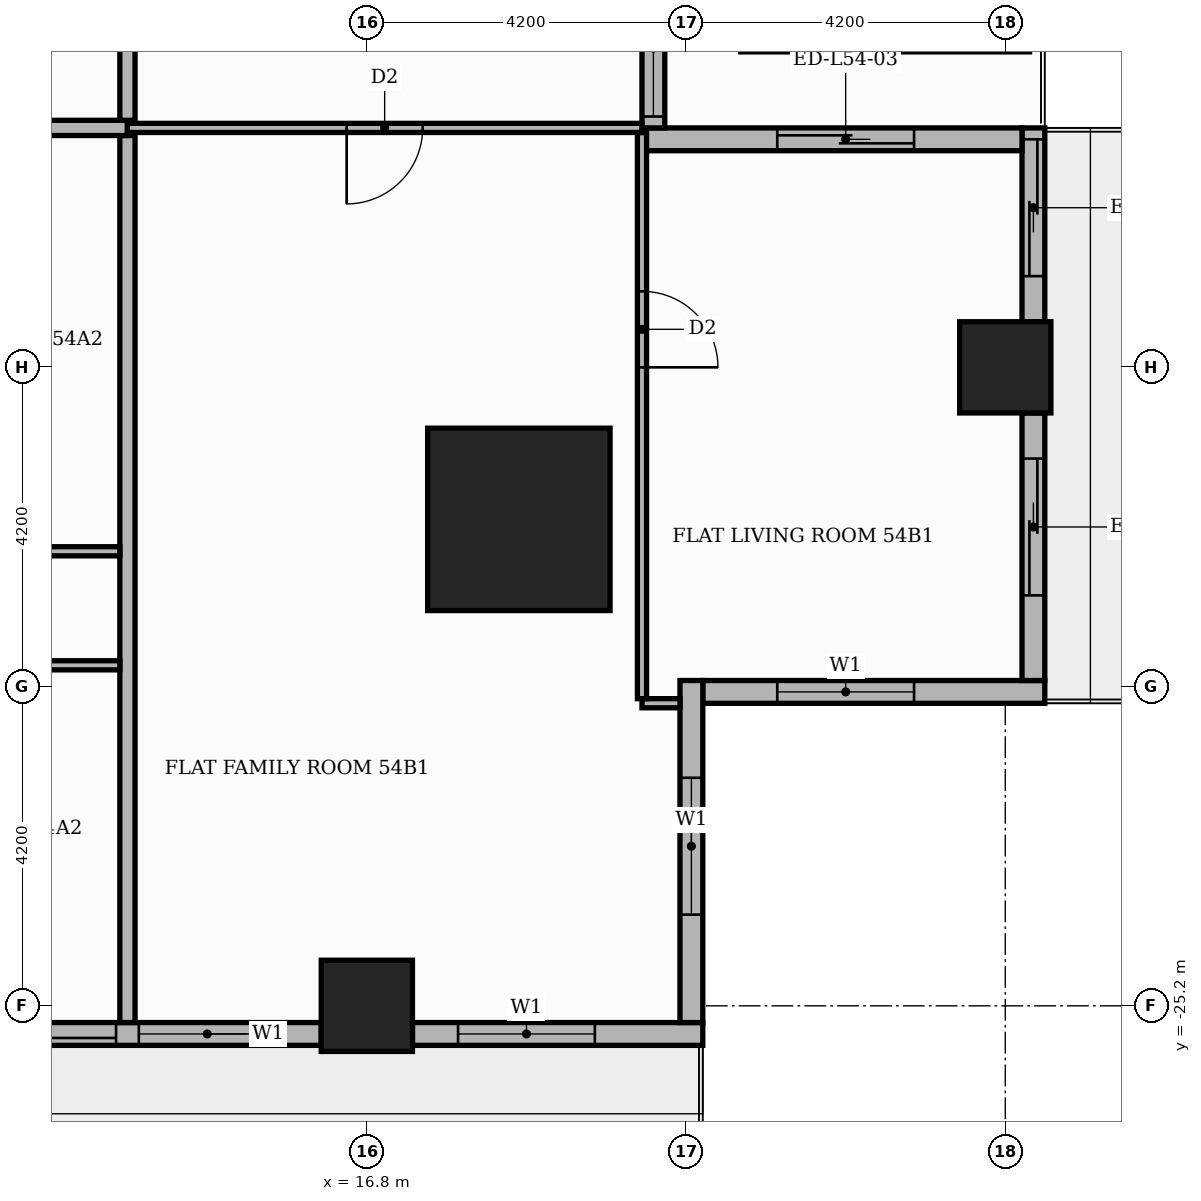
"""IFC4 building model, lengths in metres.
Left out: names, types, materials, properties, quantities, classifications, styles, units other than length and angle.
Written with IfcOpenShell. Run it as: python <this file> out.ifc"""

import sys

from ifc_helpers import new_model, si_unit, direction, frame, frame_2d, origin, origin_2d, place, context, subcontext, project, spatial, rectangle, extrude, element, fill, save


model = new_model("IFC4")
c1 = context("Model", 3, precision=1e-05, world=origin(), true_north=direction((0.0, 1.0)))
c2 = subcontext(c1, "Body", "Model", "MODEL_VIEW")
j1 = project(units=[si_unit("LENGTHUNIT", "METRE"), si_unit("PLANEANGLEUNIT", "RADIAN")], contexts=[c1])
p1 = place(None, origin())
s1 = spatial("IfcSite", under=j1, at=p1, CompositionType="ELEMENT")
p2 = place(p1, origin())
s2 = spatial("IfcBuilding", under=s1, at=p2, CompositionType="ELEMENT")
p3 = place(p2, frame((0.0, 0.0, 227.4)))
s3 = spatial("IfcBuildingStorey", under=s2, at=p3, CompositionType="ELEMENT", Elevation=227.4)
p4 = place(p3, frame((18.8, -18.8, 0.0), z_axis=(0.0, 0.0, 1.0), x_axis=(1.0, 0.0, 0.0)))
e1 = element("IfcColumn", 1, at=p4, inside=s3, PredefinedType="COLUMN", context=c2, shape_type="SweptSolid", body=[
    extrude(rectangle(XDim=2.4, YDim=2.4, at=origin_2d()), origin(), (0.0, 0.0, 1.0), 3.9),
])
for number, where, z_axis, x_axis in (
    (2, (25.2, -16.8, 0.0), (0.0, 0.0, 1.0), (1.0, 0.0, 0.0)),
    (3, (16.8, -25.2, 0.0), (0.0, 0.0, 1.0), (1.0, 0.0, 0.0)),
):
    element("IfcColumn", number, at=place(p3, frame(where, z_axis=z_axis, x_axis=x_axis)), inside=s3, PredefinedType="COLUMN", context=c2, shape_type="SweptSolid", body=[
        extrude(rectangle(XDim=1.2, YDim=1.2, at=origin_2d()), origin(), (0.0, 0.0, 1.0), 3.9),
    ])
p5 = place(p3, frame((21.22, -21.07, 0.0), z_axis=(0.0, 0.0, 1.0), x_axis=(1.0, 0.0, 0.0)))
e4 = element("IfcWall", 4, at=p5, inside=s3, PredefinedType="STANDARD", context=c2, shape_type="SweptSolid", body=[
    extrude(rectangle(XDim=4.5, YDim=0.3, at=frame_2d((2.25, 0.0))), origin(), (0.0, 0.0, 1.0), 3.48),
])
p6 = place(p5, frame((0.98, 0.0, 0.9)))
e5 = element("IfcOpeningElement", 5, at=p6, cuts=e4, PredefinedType="OPENING", context=c2, shape_type="SweptSolid", body=[
    extrude(rectangle(XDim=1.8, YDim=2.1, at=frame_2d((0.9, 1.05))), frame((0.0, 0.16, 0.0), z_axis=(0.0, -1.0, 0.0), x_axis=(1.0, 0.0, 0.0)), (0.0, 0.0, 1.0), 0.32),
])
p7 = place(p3, frame((25.57, -20.92, 0.0), z_axis=(0.0, 0.0, 1.0), x_axis=(0.0, 1.0, 0.0)))
e6 = element("IfcWall", 6, at=p7, inside=s3, PredefinedType="STANDARD", context=c2, shape_type="SweptSolid", body=[
    extrude(rectangle(XDim=3.52, YDim=0.3, at=frame_2d((1.76, 0.0))), origin(), (0.0, 0.0, 1.0), 3.48),
])
p8 = place(p7, frame((1.12, 0.0, 0.0)))
e7 = element("IfcOpeningElement", 7, at=p8, cuts=e6, PredefinedType="OPENING", context=c2, shape_type="SweptSolid", body=[
    extrude(rectangle(XDim=1.8, YDim=2.4, at=frame_2d((0.9, 1.2))), frame((0.0, 0.16, 0.0), z_axis=(0.0, -1.0, 0.0), x_axis=(1.0, 0.0, 0.0)), (0.0, 0.0, 1.0), 0.32),
])
p9 = place(p3, frame((25.57, -16.2, 0.0), z_axis=(0.0, 0.0, 1.0), x_axis=(0.0, 1.0, 0.0)))
e8 = element("IfcWall", 8, at=p9, inside=s3, PredefinedType="STANDARD", context=c2, shape_type="SweptSolid", body=[
    extrude(rectangle(XDim=2.55, YDim=0.3, at=frame_2d((1.275, 0.0))), origin(), (0.0, 0.0, 1.0), 3.48),
])
p10 = place(p9, frame((0.6, 0.0, 0.0)))
e9 = element("IfcOpeningElement", 9, at=p10, cuts=e8, PredefinedType="OPENING", context=c2, shape_type="SweptSolid", body=[
    extrude(rectangle(XDim=1.8, YDim=2.4, at=frame_2d((0.9, 1.2))), frame((0.0, 0.16, 0.0), z_axis=(0.0, -1.0, 0.0), x_axis=(1.0, 0.0, 0.0)), (0.0, 0.0, 1.0), 0.32),
])
p11 = place(p3, frame((25.42, -13.8, 0.0), z_axis=(0.0, 0.0, 1.0), x_axis=(-1.0, 0.0, 0.0)))
e10 = element("IfcWall", 10, at=p11, inside=s3, PredefinedType="STANDARD", context=c2, shape_type="SweptSolid", body=[
    extrude(rectangle(XDim=5.0, YDim=0.3, at=frame_2d((2.5, 0.0))), origin(), (0.0, 0.0, 1.0), 3.48),
])
p12 = place(p11, frame((1.42, 0.0, 0.0)))
e11 = element("IfcOpeningElement", 11, at=p12, cuts=e10, PredefinedType="OPENING", context=c2, shape_type="SweptSolid", body=[
    extrude(rectangle(XDim=1.8, YDim=2.4, at=frame_2d((0.9, 1.2))), frame((0.0, 0.16, 0.0), z_axis=(0.0, -1.0, 0.0), x_axis=(1.0, 0.0, 0.0)), (0.0, 0.0, 1.0), 0.32),
])
p13 = place(p3, frame((20.57, -13.65, 0.0), z_axis=(0.0, 0.0, 1.0), x_axis=(0.0, 1.0, 0.0)))
e12 = element("IfcWall", 12, at=p13, inside=s3, PredefinedType="STANDARD", context=c2, shape_type="SweptSolid", body=[
    extrude(rectangle(XDim=27.6, YDim=0.3, at=frame_2d((13.8, 0.0))), origin(), (0.0, 0.0, 1.0), 3.48),
])
p14 = place(p13, frame((0.15, 0.0, 0.9)))
e13 = element("IfcOpeningElement", 13, at=p14, cuts=e12, PredefinedType="OPENING", context=c2, shape_type="SweptSolid", body=[
    extrude(rectangle(XDim=1.8, YDim=2.1, at=frame_2d((0.9, 1.05))), frame((0.0, 0.16, 0.0), z_axis=(0.0, -1.0, 0.0), x_axis=(1.0, 0.0, 0.0)), (0.0, 0.0, 1.0), 0.32),
])
p15 = place(p13, frame((2.25, 0.0, 0.9)))
e14 = element("IfcOpeningElement", 14, at=p15, cuts=e12, PredefinedType="OPENING", context=c2, shape_type="SweptSolid", body=[
    extrude(rectangle(XDim=6.0, YDim=2.1, at=frame_2d((3.0, 1.05))), frame((0.0, 0.16, 0.0), z_axis=(0.0, -1.0, 0.0), x_axis=(1.0, 0.0, 0.0)), (0.0, 0.0, 1.0), 0.32),
])
p16 = place(p13, frame((8.55, 0.0, 0.9)))
e15 = element("IfcOpeningElement", 15, at=p16, cuts=e12, PredefinedType="OPENING", context=c2, shape_type="SweptSolid", body=[
    extrude(rectangle(XDim=6.0, YDim=2.1, at=frame_2d((3.0, 1.05))), frame((0.0, 0.16, 0.0), z_axis=(0.0, -1.0, 0.0), x_axis=(1.0, 0.0, 0.0)), (0.0, 0.0, 1.0), 0.32),
])
p17 = place(p13, frame((14.85, 0.0, 0.9)))
e16 = element("IfcOpeningElement", 16, at=p17, cuts=e12, PredefinedType="OPENING", context=c2, shape_type="SweptSolid", body=[
    extrude(rectangle(XDim=6.0, YDim=2.1, at=frame_2d((3.0, 1.05))), frame((0.0, 0.16, 0.0), z_axis=(0.0, -1.0, 0.0), x_axis=(1.0, 0.0, 0.0)), (0.0, 0.0, 1.0), 0.32),
])
p18 = place(p13, frame((21.15, 0.0, 0.9)))
e17 = element("IfcOpeningElement", 17, at=p18, cuts=e12, PredefinedType="OPENING", context=c2, shape_type="SweptSolid", body=[
    extrude(rectangle(XDim=6.0, YDim=2.1, at=frame_2d((3.0, 1.05))), frame((0.0, 0.16, 0.0), z_axis=(0.0, -1.0, 0.0), x_axis=(1.0, 0.0, 0.0)), (0.0, 0.0, 1.0), 0.32),
])
p19 = place(p3, frame((9.0, -25.57, 0.0), z_axis=(0.0, 0.0, 1.0), x_axis=(1.0, 0.0, 0.0)))
e18 = element("IfcWall", 18, at=p19, inside=s3, PredefinedType="STANDARD", context=c2, shape_type="SweptSolid", body=[
    extrude(rectangle(XDim=7.2, YDim=0.3, at=frame_2d((3.6, 0.0))), origin(), (0.0, 0.0, 1.0), 3.48),
])
p20 = place(p19, frame((0.6, 0.0, 0.0)))
e19 = element("IfcOpeningElement", 19, at=p20, cuts=e18, PredefinedType="OPENING", context=c2, shape_type="SweptSolid", body=[
    extrude(rectangle(XDim=3.9, YDim=2.4, at=frame_2d((1.95, 1.2))), frame((0.0, 0.16, 0.0), z_axis=(0.0, -1.0, 0.0), x_axis=(1.0, 0.0, 0.0)), (0.0, 0.0, 1.0), 0.32),
])
p21 = place(p19, frame((4.8, 0.0, 0.9)))
e20 = element("IfcOpeningElement", 20, at=p21, cuts=e18, PredefinedType="OPENING", context=c2, shape_type="SweptSolid", body=[
    extrude(rectangle(XDim=1.8, YDim=2.1, at=frame_2d((0.9, 1.05))), frame((0.0, 0.16, 0.0), z_axis=(0.0, -1.0, 0.0), x_axis=(1.0, 0.0, 0.0)), (0.0, 0.0, 1.0), 0.32),
])
p22 = place(p3, frame((17.4, -25.57, 0.0), z_axis=(0.0, 0.0, 1.0), x_axis=(1.0, 0.0, 0.0)))
e21 = element("IfcWall", 21, at=p22, inside=s3, PredefinedType="STANDARD", context=c2, shape_type="SweptSolid", body=[
    extrude(rectangle(XDim=3.82, YDim=0.3, at=frame_2d((1.91, 0.0))), origin(), (0.0, 0.0, 1.0), 3.48),
])
p23 = place(p22, frame((0.6, 0.0, 0.9)))
e22 = element("IfcOpeningElement", 22, at=p23, cuts=e21, PredefinedType="OPENING", context=c2, shape_type="SweptSolid", body=[
    extrude(rectangle(XDim=1.8, YDim=2.1, at=frame_2d((0.9, 1.05))), frame((0.0, 0.16, 0.0), z_axis=(0.0, -1.0, 0.0), x_axis=(1.0, 0.0, 0.0)), (0.0, 0.0, 1.0), 0.32),
])
p24 = place(p3, frame((21.07, -25.42, 0.0), z_axis=(0.0, 0.0, 1.0), x_axis=(0.0, 1.0, 0.0)))
e23 = element("IfcWall", 23, at=p24, inside=s3, PredefinedType="STANDARD", context=c2, shape_type="SweptSolid", body=[
    extrude(rectangle(XDim=4.5, YDim=0.3, at=frame_2d((2.25, 0.0))), origin(), (0.0, 0.0, 1.0), 3.48),
])
p25 = place(p24, frame((1.42, 0.0, 0.9)))
e24 = element("IfcOpeningElement", 24, at=p25, cuts=e23, PredefinedType="OPENING", context=c2, shape_type="SweptSolid", body=[
    extrude(rectangle(XDim=1.8, YDim=2.1, at=frame_2d((0.9, 1.05))), frame((0.0, 0.16, 0.0), z_axis=(0.0, -1.0, 0.0), x_axis=(1.0, 0.0, 0.0)), (0.0, 0.0, 1.0), 0.32),
])
p26 = place(p3, frame((13.65, -25.42, 0.0), z_axis=(0.0, 0.0, 1.0), x_axis=(0.0, 1.0, 0.0)))
e25 = element("IfcWall", 25, at=p26, inside=s3, PredefinedType="PARTITIONING", context=c2, shape_type="SweptSolid", body=[
    extrude(rectangle(XDim=11.67, YDim=0.2, at=frame_2d((5.835, 0.0))), origin(), (0.0, 0.0, 1.0), 3.48),
])
p27 = place(p3, frame((20.42, -21.219, 0.0), z_axis=(0.0, 0.0, 1.0), x_axis=(1.0, 0.0, 0.0)))
e26 = element("IfcWall", 26, at=p27, inside=s3, PredefinedType="PARTITIONING", context=c2, shape_type="SweptSolid", body=[
    extrude(rectangle(XDim=0.501, YDim=0.12, at=frame_2d((0.25, 0.0))), origin(), (0.0, 0.0, 1.0), 3.48),
])
p28 = place(p3, frame((20.42, -21.159, 0.0), z_axis=(0.0, 0.0, 1.0), x_axis=(0.0, 1.0, 0.0)))
e27 = element("IfcWall", 27, at=p28, inside=s3, PredefinedType="PARTITIONING", context=c2, shape_type="SweptSolid", body=[
    extrude(rectangle(XDim=7.448, YDim=0.12, at=frame_2d((3.724, 0.0))), origin(), (0.0, 0.0, 1.0), 3.48),
])
p29 = place(p28, frame((4.359, 0.0, 0.0)))
e28 = element("IfcOpeningElement", 28, at=p29, cuts=e27, PredefinedType="OPENING", context=c2, shape_type="SweptSolid", body=[
    extrude(rectangle(XDim=1.0, YDim=2.1, at=frame_2d((0.5, 1.05))), frame((0.0, 0.07, 0.0), z_axis=(0.0, -1.0, 0.0), x_axis=(1.0, 0.0, 0.0)), (0.0, 0.0, 1.0), 0.14),
])
p30 = place(p3, frame((-5.15, -20.72, 0.0), z_axis=(0.0, 0.0, 1.0), x_axis=(1.0, 0.0, 0.0)))
e29 = element("IfcWall", 29, at=p30, inside=s3, PredefinedType="PARTITIONING", context=c2, shape_type="SweptSolid", body=[
    extrude(rectangle(XDim=18.7, YDim=0.12, at=frame_2d((9.35, 0.0))), origin(), (0.0, 0.0, 1.0), 3.48),
])
p31 = place(p30, frame((3.65, 0.0, 0.0)))
e30 = element("IfcOpeningElement", 30, at=p31, cuts=e29, PredefinedType="OPENING", context=c2, shape_type="SweptSolid", body=[
    extrude(rectangle(XDim=0.9, YDim=2.1, at=frame_2d((0.45, 1.05))), frame((0.0, 0.07, 0.0), z_axis=(0.0, -1.0, 0.0), x_axis=(1.0, 0.0, 0.0)), (0.0, 0.0, 1.0), 0.14),
])
p32 = place(p30, frame((15.15, 0.0, 0.0)))
e31 = element("IfcOpeningElement", 31, at=p32, cuts=e29, PredefinedType="OPENING", context=c2, shape_type="SweptSolid", body=[
    extrude(rectangle(XDim=1.0, YDim=2.1, at=frame_2d((0.5, 1.05))), frame((0.0, 0.07, 0.0), z_axis=(0.0, -1.0, 0.0), x_axis=(1.0, 0.0, 0.0)), (0.0, 0.0, 1.0), 0.14),
])
p33 = place(p3, frame((1.05, -19.22, 0.0), z_axis=(0.0, 0.0, 1.0), x_axis=(1.0, 0.0, 0.0)))
e32 = element("IfcWall", 32, at=p33, inside=s3, PredefinedType="PARTITIONING", context=c2, shape_type="SweptSolid", body=[
    extrude(rectangle(XDim=12.5, YDim=0.12, at=frame_2d((6.25, 0.0))), origin(), (0.0, 0.0, 1.0), 3.48),
])
p34 = place(p33, frame((2.7, 0.0, 0.0)))
e33 = element("IfcOpeningElement", 33, at=p34, cuts=e32, PredefinedType="OPENING", context=c2, shape_type="SweptSolid", body=[
    extrude(rectangle(XDim=0.9, YDim=2.1, at=frame_2d((0.45, 1.05))), frame((0.0, 0.07, 0.0), z_axis=(0.0, -1.0, 0.0), x_axis=(1.0, 0.0, 0.0)), (0.0, 0.0, 1.0), 0.14),
])
p35 = place(p33, frame((6.9, 0.0, 0.0)))
e34 = element("IfcOpeningElement", 34, at=p35, cuts=e32, PredefinedType="OPENING", context=c2, shape_type="SweptSolid", body=[
    extrude(rectangle(XDim=0.9, YDim=2.1, at=frame_2d((0.45, 1.05))), frame((0.0, 0.07, 0.0), z_axis=(0.0, -1.0, 0.0), x_axis=(1.0, 0.0, 0.0)), (0.0, 0.0, 1.0), 0.14),
])
p36 = place(p33, frame((10.05, 0.0, 0.0)))
e35 = element("IfcOpeningElement", 35, at=p36, cuts=e32, PredefinedType="OPENING", context=c2, shape_type="SweptSolid", body=[
    extrude(rectangle(XDim=0.9, YDim=2.1, at=frame_2d((0.45, 1.05))), frame((0.0, 0.07, 0.0), z_axis=(0.0, -1.0, 0.0), x_axis=(1.0, 0.0, 0.0)), (0.0, 0.0, 1.0), 0.14),
])
p37 = place(p3, frame((-25.42, -13.65, 0.0), z_axis=(0.0, 0.0, 1.0), x_axis=(1.0, 0.0, 0.0)))
e36 = element("IfcWall", 36, at=p37, inside=s3, PredefinedType="PARTITIONING", context=c2, shape_type="SweptSolid", body=[
    extrude(rectangle(XDim=39.07, YDim=0.2, at=frame_2d((19.535, 0.0))), origin(), (0.0, 0.0, 1.0), 3.48),
])
p38 = place(p37, frame((13.32, 0.0, 0.0)))
e37 = element("IfcOpeningElement", 37, at=p38, cuts=e36, PredefinedType="OPENING", context=c2, shape_type="SweptSolid", body=[
    extrude(rectangle(XDim=1.1, YDim=2.4, at=frame_2d((0.55, 1.2))), frame((0.0, 0.11, 0.0), z_axis=(0.0, -1.0, 0.0), x_axis=(1.0, 0.0, 0.0)), (0.0, 0.0, 1.0), 0.22),
])
p39 = place(p37, frame((23.82, 0.0, 0.0)))
e38 = element("IfcOpeningElement", 38, at=p39, cuts=e36, PredefinedType="OPENING", context=c2, shape_type="SweptSolid", body=[
    extrude(rectangle(XDim=1.1, YDim=2.4, at=frame_2d((0.55, 1.2))), frame((0.0, 0.11, 0.0), z_axis=(0.0, -1.0, 0.0), x_axis=(1.0, 0.0, 0.0)), (0.0, 0.0, 1.0), 0.22),
])
p40 = place(p3, frame((13.65, -13.65, 0.0), z_axis=(0.0, 0.0, 1.0), x_axis=(1.0, 0.0, 0.0)))
e39 = element("IfcWall", 39, at=p40, inside=s3, PredefinedType="PARTITIONING", context=c2, shape_type="SweptSolid", body=[
    extrude(rectangle(XDim=6.769, YDim=0.12, at=frame_2d((3.385, 0.0))), origin(), (0.0, 0.0, 1.0), 3.48),
])
p41 = place(p40, frame((2.885, 0.0, 0.0)))
e40 = element("IfcOpeningElement", 40, at=p41, cuts=e39, PredefinedType="OPENING", context=c2, shape_type="SweptSolid", body=[
    extrude(rectangle(XDim=1.0, YDim=2.1, at=frame_2d((0.5, 1.05))), frame((0.0, 0.07, 0.0), z_axis=(0.0, -1.0, 0.0), x_axis=(1.0, 0.0, 0.0)), (0.0, 0.0, 1.0), 0.14),
])
p42 = place(p3, frame((13.65, -13.55, 0.0), z_axis=(0.0, 0.0, 1.0), x_axis=(0.0, 1.0, 0.0)))
e41 = element("IfcWall", 41, at=p42, inside=s3, PredefinedType="PARTITIONING", context=c2, shape_type="SweptSolid", body=[
    extrude(rectangle(XDim=2.45, YDim=0.2, at=frame_2d((1.225, 0.0))), origin(), (0.0, 0.0, 1.0), 3.48),
])
p43 = place(p6, origin())
e42 = element("IfcWindow", 42, at=p43, inside=s3, PartitioningType="SINGLE_PANEL", PredefinedType="WINDOW", context=c2, shape_type="SweptSolid", body=[
    extrude(rectangle(XDim=1.8, YDim=2.1, at=frame_2d((0.9, 1.05))), frame((0.0, 0.03, 0.0), z_axis=(0.0, -1.0, 0.0), x_axis=(1.0, 0.0, 0.0)), (0.0, 0.0, 1.0), 0.06),
])
fill(e5, e42)
p44 = place(p8, origin())
e43 = element("IfcDoor", 43, at=p44, inside=s3, OperationType="SLIDING_TO_RIGHT", PredefinedType="DOOR", context=c2, shape_type="SweptSolid", body=[
    extrude(rectangle(XDim=1.8, YDim=2.4, at=frame_2d((0.9, 1.2))), frame((0.0, 0.025, 0.0), z_axis=(0.0, -1.0, 0.0), x_axis=(1.0, 0.0, 0.0)), (0.0, 0.0, 1.0), 0.05),
])
fill(e7, e43)
p45 = place(p10, origin())
e44 = element("IfcDoor", 44, at=p45, inside=s3, OperationType="SLIDING_TO_LEFT", PredefinedType="DOOR", context=c2, shape_type="SweptSolid", body=[
    extrude(rectangle(XDim=1.8, YDim=2.4, at=frame_2d((0.9, 1.2))), frame((0.0, 0.025, 0.0), z_axis=(0.0, -1.0, 0.0), x_axis=(1.0, 0.0, 0.0)), (0.0, 0.0, 1.0), 0.05),
])
fill(e9, e44)
p46 = place(p12, origin())
e45 = element("IfcDoor", 45, at=p46, inside=s3, OperationType="SLIDING_TO_LEFT", PredefinedType="DOOR", context=c2, shape_type="SweptSolid", body=[
    extrude(rectangle(XDim=1.8, YDim=2.4, at=frame_2d((0.9, 1.2))), frame((0.0, 0.025, 0.0), z_axis=(0.0, -1.0, 0.0), x_axis=(1.0, 0.0, 0.0)), (0.0, 0.0, 1.0), 0.05),
])
fill(e11, e45)
p47 = place(p14, origin())
e46 = element("IfcWindow", 46, at=p47, inside=s3, PartitioningType="SINGLE_PANEL", PredefinedType="WINDOW", context=c2, shape_type="SweptSolid", body=[
    extrude(rectangle(XDim=1.8, YDim=2.1, at=frame_2d((0.9, 1.05))), frame((0.0, 0.03, 0.0), z_axis=(0.0, -1.0, 0.0), x_axis=(1.0, 0.0, 0.0)), (0.0, 0.0, 1.0), 0.06),
])
fill(e13, e46)
p48 = place(p20, origin())
e47 = element("IfcDoor", 47, at=p48, inside=s3, OperationType="SLIDING_TO_LEFT", PredefinedType="DOOR", context=c2, shape_type="SweptSolid", body=[
    extrude(rectangle(XDim=3.9, YDim=2.4, at=frame_2d((1.95, 1.2))), frame((0.0, 0.025, 0.0), z_axis=(0.0, -1.0, 0.0), x_axis=(1.0, 0.0, 0.0)), (0.0, 0.0, 1.0), 0.05),
])
fill(e19, e47)
p49 = place(p21, origin())
e48 = element("IfcWindow", 48, at=p49, inside=s3, PartitioningType="SINGLE_PANEL", PredefinedType="WINDOW", context=c2, shape_type="SweptSolid", body=[
    extrude(rectangle(XDim=1.8, YDim=2.1, at=frame_2d((0.9, 1.05))), frame((0.0, 0.03, 0.0), z_axis=(0.0, -1.0, 0.0), x_axis=(1.0, 0.0, 0.0)), (0.0, 0.0, 1.0), 0.06),
])
fill(e20, e48)
p50 = place(p23, origin())
e49 = element("IfcWindow", 49, at=p50, inside=s3, PartitioningType="SINGLE_PANEL", PredefinedType="WINDOW", context=c2, shape_type="SweptSolid", body=[
    extrude(rectangle(XDim=1.8, YDim=2.1, at=frame_2d((0.9, 1.05))), frame((0.0, 0.03, 0.0), z_axis=(0.0, -1.0, 0.0), x_axis=(1.0, 0.0, 0.0)), (0.0, 0.0, 1.0), 0.06),
])
fill(e22, e49)
p51 = place(p25, origin())
e50 = element("IfcWindow", 50, at=p51, inside=s3, PartitioningType="SINGLE_PANEL", PredefinedType="WINDOW", context=c2, shape_type="SweptSolid", body=[
    extrude(rectangle(XDim=1.8, YDim=2.1, at=frame_2d((0.9, 1.05))), frame((0.0, 0.03, 0.0), z_axis=(0.0, -1.0, 0.0), x_axis=(1.0, 0.0, 0.0)), (0.0, 0.0, 1.0), 0.06),
])
fill(e24, e50)
p52 = place(p41, frame((1.0, 0.0, 0.0), z_axis=(0.0, 0.0, 1.0), x_axis=(-1.0, 0.0, 0.0)))
e51 = element("IfcDoor", 51, at=p52, inside=s3, OperationType="SINGLE_SWING_LEFT", PredefinedType="DOOR", context=c2, shape_type="SweptSolid", body=[
    extrude(rectangle(XDim=1.0, YDim=2.1, at=frame_2d((0.5, 1.05))), frame((0.0, 0.025, 0.0), z_axis=(0.0, -1.0, 0.0), x_axis=(1.0, 0.0, 0.0)), (0.0, 0.0, 1.0), 0.05),
])
fill(e40, e51)
p53 = place(p29, frame((1.0, 0.0, 0.0), z_axis=(0.0, 0.0, 1.0), x_axis=(-1.0, 0.0, 0.0)))
e52 = element("IfcDoor", 52, at=p53, inside=s3, OperationType="SINGLE_SWING_LEFT", PredefinedType="DOOR", context=c2, shape_type="SweptSolid", body=[
    extrude(rectangle(XDim=1.0, YDim=2.1, at=frame_2d((0.5, 1.05))), frame((0.0, 0.025, 0.0), z_axis=(0.0, -1.0, 0.0), x_axis=(1.0, 0.0, 0.0)), (0.0, 0.0, 1.0), 0.05),
])
fill(e28, e52)
save(model, sys.argv[1])
